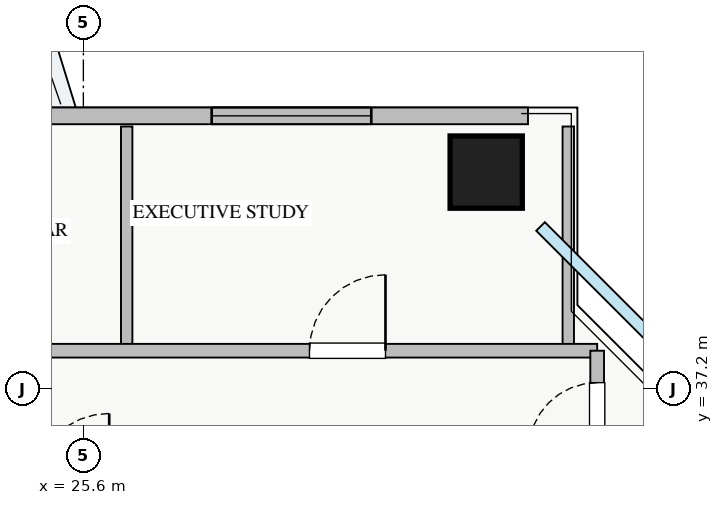
"""IFC4 building model, lengths in metres.
Left out: names, types, materials, properties, quantities, classifications, styles, units other than length and angle.
Written with IfcOpenShell. Run it as: python <this file> out.ifc"""

import sys

from ifc_helpers import new_model, si_unit, direction, frame, frame_2d, origin, origin_2d, place, context, subcontext, project, spatial, rectangle, extrude, source, transform, mapped, element, fill, save


model = new_model("IFC4")
c1 = context("Model", 3, precision=1e-05, world=origin(), true_north=direction((0.0, 1.0)))
c2 = subcontext(c1, "Body", "Model", "MODEL_VIEW")
j1 = project(units=[si_unit("LENGTHUNIT", "METRE"), si_unit("PLANEANGLEUNIT", "RADIAN")], contexts=[c1])
p1 = place(None, origin())
s1 = spatial("IfcSite", under=j1, at=p1, CompositionType="ELEMENT")
p2 = place(p1, origin())
s2 = spatial("IfcBuilding", under=s1, at=p2, CompositionType="ELEMENT")
p3 = place(p2, frame((0.0, 0.0, 147.0)))
s3 = spatial("IfcBuildingStorey", under=s2, at=p3, CompositionType="ELEMENT", Elevation=147.0)
m1 = source(origin(), c2, "Body", "SweptSolid", [
    extrude(rectangle(XDim=0.95, YDim=0.95, at=origin_2d()), origin(), (0.0, 0.0, 1.0), 3.25),
])
p4 = place(p3, frame((30.9, 40.05, 0.0), z_axis=(0.0, 0.0, 1.0), x_axis=(1.0, 0.0, 0.0)))
e1 = element("IfcColumn", 1, at=p4, inside=s3, PredefinedType="COLUMN", context=c2, shape_type="MappedRepresentation", body=[
    mapped(m1, transform((0.0, 0.0, 0.0), x_axis=(1.0, 0.0, 0.0), y_axis=(0.0, 1.0, 0.0), z_axis=(0.0, 0.0, 1.0), scale=1.0)),
])
p5 = place(p3, frame((6.55, 40.79, 0.0), z_axis=(0.0, 0.0, 1.0), x_axis=(1.0, 0.0, 0.0)))
e2 = element("IfcWall", 2, at=p5, inside=s3, PredefinedType="STANDARD", context=c2, shape_type="SweptSolid", body=[
    extrude(rectangle(XDim=24.9, YDim=0.22, at=frame_2d((12.45, 0.0))), origin(), (0.0, 0.0, 1.0), 2.61),
])
p6 = place(p5, frame((13.3, 0.0, 0.0)))
e3 = element("IfcOpeningElement", 3, at=p6, cuts=e2, PredefinedType="OPENING", context=c2, shape_type="SweptSolid", body=[
    extrude(rectangle(XDim=1.2, YDim=2.1, at=frame_2d((0.6, 1.05))), frame((0.0, 0.12, 0.0), z_axis=(0.0, -1.0, 0.0), x_axis=(1.0, 0.0, 0.0)), (0.0, 0.0, 1.0), 0.24),
])
p7 = place(p5, frame((0.357, 0.0, 0.9)))
e4 = element("IfcOpeningElement", 4, at=p7, cuts=e2, PredefinedType="OPENING", context=c2, shape_type="SweptSolid", body=[
    extrude(rectangle(XDim=1.5, YDim=1.5, at=frame_2d((0.75, 0.75))), frame((0.0, 0.12, 0.0), z_axis=(0.0, -1.0, 0.0), x_axis=(1.0, 0.0, 0.0)), (0.0, 0.0, 1.0), 0.24),
])
p8 = place(p5, frame((9.77, 0.0, 0.9)))
e5 = element("IfcOpeningElement", 5, at=p8, cuts=e2, PredefinedType="OPENING", context=c2, shape_type="SweptSolid", body=[
    extrude(rectangle(XDim=1.8, YDim=1.5, at=frame_2d((0.9, 0.75))), frame((0.0, 0.12, 0.0), z_axis=(0.0, -1.0, 0.0), x_axis=(1.0, 0.0, 0.0)), (0.0, 0.0, 1.0), 0.24),
])
p9 = place(p5, frame((14.813, 0.0, 0.9)))
e6 = element("IfcOpeningElement", 6, at=p9, cuts=e2, PredefinedType="OPENING", context=c2, shape_type="SweptSolid", body=[
    extrude(rectangle(XDim=1.5, YDim=1.45, at=frame_2d((0.75, 0.725))), frame((0.0, 0.12, 0.0), z_axis=(0.0, -1.0, 0.0), x_axis=(1.0, 0.0, 0.0)), (0.0, 0.0, 1.0), 0.24),
])
p10 = place(p5, frame((20.738, 0.0, 0.9)))
e7 = element("IfcOpeningElement", 7, at=p10, cuts=e2, PredefinedType="OPENING", context=c2, shape_type="SweptSolid", body=[
    extrude(rectangle(XDim=2.1, YDim=1.48, at=frame_2d((1.05, 0.74))), frame((0.0, 0.12, 0.0), z_axis=(0.0, -1.0, 0.0), x_axis=(1.0, 0.0, 0.0)), (0.0, 0.0, 1.0), 0.24),
])
p11 = place(p5, frame((4.136, 0.0, 0.9)))
e8 = element("IfcOpeningElement", 8, at=p11, cuts=e2, PredefinedType="OPENING", context=c2, shape_type="SweptSolid", body=[
    extrude(rectangle(XDim=2.4, YDim=1.5, at=frame_2d((1.2, 0.75))), frame((0.0, 0.12, 0.0), z_axis=(0.0, -1.0, 0.0), x_axis=(1.0, 0.0, 0.0)), (0.0, 0.0, 1.0), 0.24),
])
for number, where, z_axis, x_axis in (
    (9, (26.17, 37.7, 0.0), (0.0, 0.0, 1.0), (0.0, 1.0, 0.0)),
    (10, (31.98, 37.7, 0.0), (0.0, 0.0, 1.0), (0.0, 1.0, 0.0)),
):
    element("IfcWall", number, at=place(p3, frame(where, z_axis=z_axis, x_axis=x_axis)), inside=s3, PredefinedType="PARTITIONING", context=c2, shape_type="SweptSolid", body=[
        extrude(rectangle(XDim=2.95, YDim=0.15, at=frame_2d((1.475, 0.0))), origin(), (0.0, 0.0, 1.0), 3.07),
    ])
p12 = place(p3, frame((8.75, 37.7, 0.0), z_axis=(0.0, 0.0, 1.0), x_axis=(1.0, 0.0, 0.0)))
e11 = element("IfcWall", 11, at=p12, inside=s3, PredefinedType="PARTITIONING", context=c2, shape_type="SweptSolid", body=[
    extrude(rectangle(XDim=23.61, YDim=0.18, at=frame_2d((11.805, 0.0))), origin(), (0.0, 0.0, 1.0), 3.07),
])
p13 = place(p12, frame((2.795, 0.0, 0.0)))
e12 = element("IfcOpeningElement", 12, at=p13, cuts=e11, PredefinedType="OPENING", context=c2, shape_type="SweptSolid", body=[
    extrude(rectangle(XDim=1.0, YDim=2.05, at=frame_2d((0.5, 1.025))), frame((0.0, 0.1, 0.0), z_axis=(0.0, -1.0, 0.0), x_axis=(1.0, 0.0, 0.0)), (0.0, 0.0, 1.0), 0.2),
])
p14 = place(p12, frame((7.97, 0.0, 0.0)))
e13 = element("IfcOpeningElement", 13, at=p14, cuts=e11, PredefinedType="OPENING", context=c2, shape_type="SweptSolid", body=[
    extrude(rectangle(XDim=1.0, YDim=2.05, at=frame_2d((0.5, 1.025))), frame((0.0, 0.1, 0.0), z_axis=(0.0, -1.0, 0.0), x_axis=(1.0, 0.0, 0.0)), (0.0, 0.0, 1.0), 0.2),
])
p15 = place(p12, frame((13.385, 0.0, 0.0)))
e14 = element("IfcOpeningElement", 14, at=p15, cuts=e11, PredefinedType="OPENING", context=c2, shape_type="SweptSolid", body=[
    extrude(rectangle(XDim=1.0, YDim=2.05, at=frame_2d((0.5, 1.025))), frame((0.0, 0.1, 0.0), z_axis=(0.0, -1.0, 0.0), x_axis=(1.0, 0.0, 0.0)), (0.0, 0.0, 1.0), 0.2),
])
p16 = place(p12, frame((19.825, 0.0, 0.0)))
e15 = element("IfcOpeningElement", 15, at=p16, cuts=e11, PredefinedType="OPENING", context=c2, shape_type="SweptSolid", body=[
    extrude(rectangle(XDim=1.0, YDim=2.05, at=frame_2d((0.5, 1.025))), frame((0.0, 0.1, 0.0), z_axis=(0.0, -1.0, 0.0), x_axis=(1.0, 0.0, 0.0)), (0.0, 0.0, 1.0), 0.2),
])
p17 = place(p3, frame((32.36, 8.3, 0.0), z_axis=(0.0, 0.0, 1.0), x_axis=(0.0, 1.0, 0.0)))
e16 = element("IfcWall", 16, at=p17, inside=s3, PredefinedType="PARTITIONING", context=c2, shape_type="SweptSolid", body=[
    extrude(rectangle(XDim=29.4, YDim=0.18, at=frame_2d((14.7, 0.0))), origin(), (0.0, 0.0, 1.0), 3.07),
])
p18 = place(p17, frame((28.08, 0.0, 0.0)))
e17 = element("IfcOpeningElement", 17, at=p18, cuts=e16, PredefinedType="OPENING", context=c2, shape_type="SweptSolid", body=[
    extrude(rectangle(XDim=0.9, YDim=2.05, at=frame_2d((0.45, 1.025))), frame((0.0, 0.1, 0.0), z_axis=(0.0, -1.0, 0.0), x_axis=(1.0, 0.0, 0.0)), (0.0, 0.0, 1.0), 0.2),
])
p19 = place(p17, frame((0.42, 0.0, 0.0)))
e18 = element("IfcOpeningElement", 18, at=p19, cuts=e16, PredefinedType="OPENING", context=c2, shape_type="SweptSolid", body=[
    extrude(rectangle(XDim=0.9, YDim=2.05, at=frame_2d((0.45, 1.025))), frame((0.0, 0.1, 0.0), z_axis=(0.0, -1.0, 0.0), x_axis=(1.0, 0.0, 0.0)), (0.0, 0.0, 1.0), 0.2),
])
p20 = place(p17, frame((8.05, 0.0, 0.0)))
e19 = element("IfcOpeningElement", 19, at=p20, cuts=e16, PredefinedType="OPENING", context=c2, shape_type="SweptSolid", body=[
    extrude(rectangle(XDim=1.0, YDim=2.05, at=frame_2d((0.5, 1.025))), frame((0.0, 0.1, 0.0), z_axis=(0.0, -1.0, 0.0), x_axis=(1.0, 0.0, 0.0)), (0.0, 0.0, 1.0), 0.2),
])
p21 = place(p17, frame((18.01, 0.0, 0.0)))
e20 = element("IfcOpeningElement", 20, at=p21, cuts=e16, PredefinedType="OPENING", context=c2, shape_type="SweptSolid", body=[
    extrude(rectangle(XDim=1.0, YDim=2.05, at=frame_2d((0.5, 1.025))), frame((0.0, 0.1, 0.0), z_axis=(0.0, -1.0, 0.0), x_axis=(1.0, 0.0, 0.0)), (0.0, 0.0, 1.0), 0.2),
])
m2 = source(origin(), c2, "Body", "SweptSolid", [
    extrude(rectangle(XDim=2.1, YDim=1.48, at=frame_2d((1.05, 0.74))), frame((0.0, 0.03, 0.0), z_axis=(0.0, -1.0, 0.0), x_axis=(1.0, 0.0, 0.0)), (0.0, 0.0, 1.0), 0.06),
])
p22 = place(p10, origin())
e21 = element("IfcWindow", 21, at=p22, inside=s3, PartitioningType="TRIPLE_PANEL_VERTICAL", PredefinedType="WINDOW", context=c2, shape_type="MappedRepresentation", body=[
    mapped(m2, transform((0.0, 0.0, 0.0), x_axis=(1.0, 0.0, 0.0), y_axis=(0.0, 1.0, 0.0), z_axis=(0.0, 0.0, 1.0), scale=1.0)),
])
fill(e7, e21)
m3 = source(origin(), c2, "Body", "SweptSolid", [
    extrude(rectangle(XDim=1.0, YDim=2.05, at=frame_2d((0.5, 1.025))), frame((0.0, 0.025, 0.0), z_axis=(0.0, -1.0, 0.0), x_axis=(1.0, 0.0, 0.0)), (0.0, 0.0, 1.0), 0.05),
])
p23 = place(p16, origin())
e22 = element("IfcDoor", 22, at=p23, inside=s3, OperationType="SINGLE_SWING_RIGHT", PredefinedType="DOOR", context=c2, shape_type="MappedRepresentation", body=[
    mapped(m3, transform((0.0, 0.0, 0.0), x_axis=(1.0, 0.0, 0.0), y_axis=(0.0, 1.0, 0.0), z_axis=(0.0, 0.0, 1.0), scale=1.0)),
])
fill(e15, e22)
m4 = source(origin(), c2, "Body", "SweptSolid", [
    extrude(rectangle(XDim=0.9, YDim=2.05, at=frame_2d((0.45, 1.025))), frame((0.0, 0.025, 0.0), z_axis=(0.0, -1.0, 0.0), x_axis=(1.0, 0.0, 0.0)), (0.0, 0.0, 1.0), 0.05),
])
p24 = place(p18, origin())
e23 = element("IfcDoor", 23, at=p24, inside=s3, OperationType="SINGLE_SWING_LEFT", PredefinedType="DOOR", context=c2, shape_type="MappedRepresentation", body=[
    mapped(m4, transform((0.0, 0.0, 0.0), x_axis=(1.0, 0.0, 0.0), y_axis=(0.0, 1.0, 0.0), z_axis=(0.0, 0.0, 1.0), scale=1.0)),
])
fill(e17, e23)
save(model, sys.argv[1])
